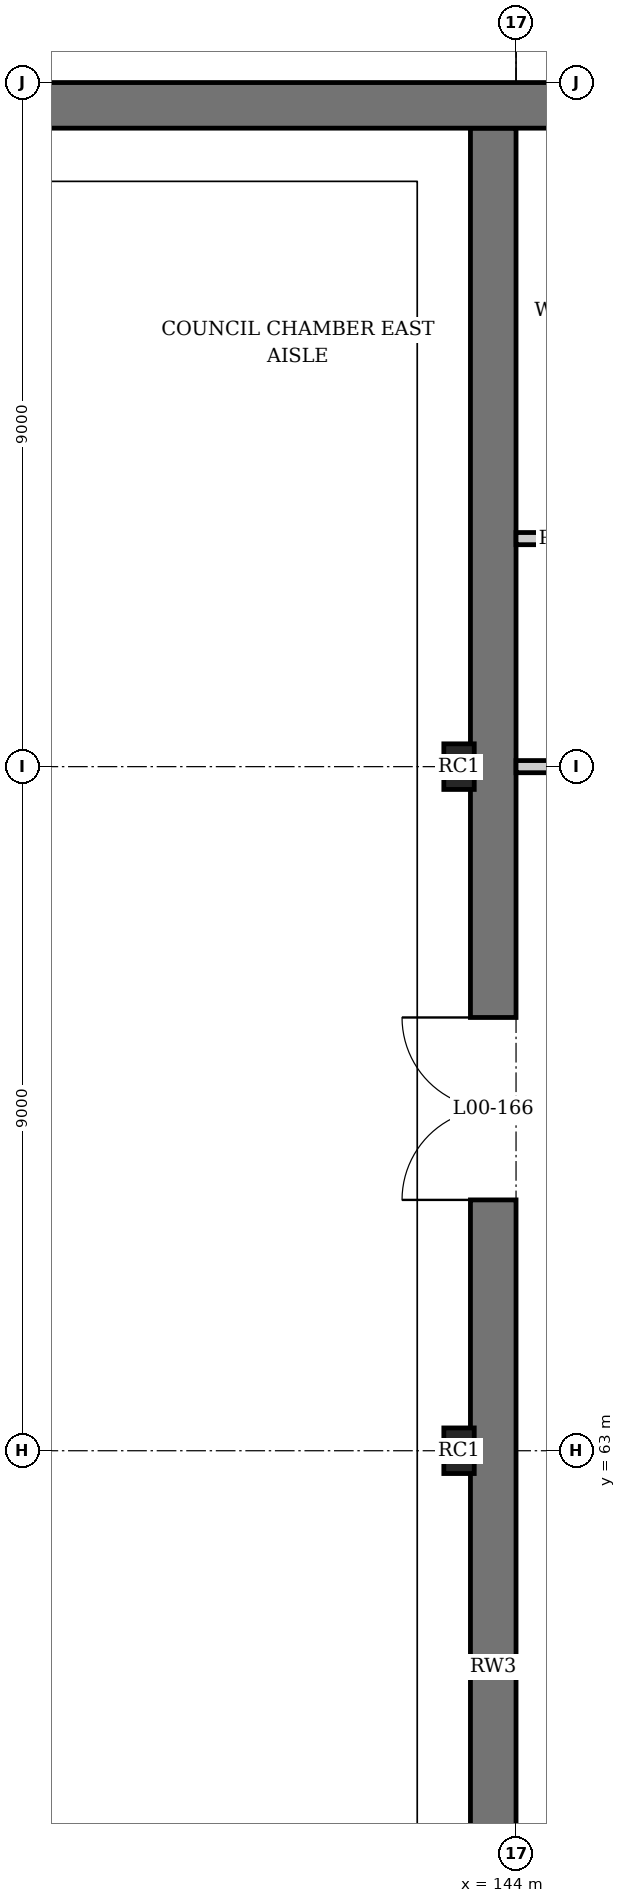
"""IFC4 building model, lengths in metres.
Left out: names, types, materials, properties, quantities, classifications, styles, units other than length and angle.
Written with IfcOpenShell. Run it as: python <this file> out.ifc"""

import sys

from ifc_helpers import new_model, si_unit, direction, frame, frame_2d, origin, origin_2d, place, context, subcontext, project, spatial, rectangle, extrude, element, fill, save


model = new_model("IFC4")
c1 = context("Model", 3, precision=1e-05, world=origin(), true_north=direction((0.0, 1.0)))
c2 = subcontext(c1, "Body", "Model", "MODEL_VIEW")
j1 = project(units=[si_unit("LENGTHUNIT", "METRE"), si_unit("PLANEANGLEUNIT", "RADIAN")], contexts=[c1])
p1 = place(None, origin())
s1 = spatial("IfcSite", under=j1, at=p1, CompositionType="ELEMENT")
p2 = place(p1, origin())
s2 = spatial("IfcBuilding", under=s1, at=p2, CompositionType="ELEMENT")
p3 = place(p2, origin())
s3 = spatial("IfcBuildingStorey", under=s2, at=p3, CompositionType="ELEMENT", Elevation=0.0)
p4 = place(p3, frame((143.7, 54.0, 0.0), z_axis=(0.0, 0.0, 1.0), x_axis=(0.0, 1.0, 0.0)))
e1 = element("IfcWall", 1, at=p4, inside=s3, PredefinedType="SHEAR", context=c2, shape_type="SweptSolid", body=[
    extrude(rectangle(XDim=26.4, YDim=0.6, at=frame_2d((13.2, 0.0))), origin(), (0.0, 0.0, 1.0), 6.0),
])
p5 = place(p4, frame((12.3, 0.0, 0.0)))
e2 = element("IfcOpeningElement", 2, at=p5, cuts=e1, PredefinedType="OPENING", context=c2, shape_type="SweptSolid", body=[
    extrude(rectangle(XDim=2.4, YDim=2.4, at=frame_2d((1.2, 1.2))), frame((0.0, 0.31, 0.0), z_axis=(0.0, -1.0, 0.0), x_axis=(1.0, 0.0, 0.0)), (0.0, 0.0, 1.0), 0.62),
])
for number, where, z_axis, x_axis in (
    (3, (143.25, 63.0, 0.0), (0.0, 0.0, 1.0), (0.0, 1.0, 0.0)),
    (4, (143.25, 72.0, 0.0), (0.0, 0.0, 1.0), (0.0, 1.0, 0.0)),
):
    element("IfcColumn", number, at=place(p3, frame(where, z_axis=z_axis, x_axis=x_axis)), inside=s3, PredefinedType="PILASTER", context=c2, shape_type="SweptSolid", body=[
        extrude(rectangle(XDim=0.6, YDim=0.4, at=origin_2d()), origin(), (0.0, 0.0, 1.0), 6.0),
    ])
p6 = place(p3, frame((0.0, 80.7, 0.0), z_axis=(0.0, 0.0, 1.0), x_axis=(1.0, 0.0, 0.0)))
e5 = element("IfcWall", 5, at=p6, inside=s3, PredefinedType="SHEAR", context=c2, shape_type="SweptSolid", body=[
    extrude(rectangle(XDim=180.0, YDim=0.6, at=frame_2d((90.0, 0.0))), origin(), (0.0, 0.0, 1.0), 6.0),
])
p7 = place(p6, frame((28.25, 0.0, 0.0)))
e6 = element("IfcOpeningElement", 6, at=p7, cuts=e5, PredefinedType="OPENING", context=c2, shape_type="SweptSolid", body=[
    extrude(rectangle(XDim=1.8, YDim=2.4, at=frame_2d((0.9, 1.2))), frame((0.0, 0.31, 0.0), z_axis=(0.0, -1.0, 0.0), x_axis=(1.0, 0.0, 0.0)), (0.0, 0.0, 1.0), 0.62),
])
p8 = place(p6, frame((82.25, 0.0, 0.0)))
e7 = element("IfcOpeningElement", 7, at=p8, cuts=e5, PredefinedType="OPENING", context=c2, shape_type="SweptSolid", body=[
    extrude(rectangle(XDim=1.8, YDim=2.4, at=frame_2d((0.9, 1.2))), frame((0.0, 0.31, 0.0), z_axis=(0.0, -1.0, 0.0), x_axis=(1.0, 0.0, 0.0)), (0.0, 0.0, 1.0), 0.62),
])
p9 = place(p6, frame((90.75, 0.0, 0.0)))
e8 = element("IfcOpeningElement", 8, at=p9, cuts=e5, PredefinedType="OPENING", context=c2, shape_type="SweptSolid", body=[
    extrude(rectangle(XDim=3.0, YDim=3.0, at=frame_2d((1.5, 1.5))), frame((0.0, 0.31, 0.0), z_axis=(0.0, -1.0, 0.0), x_axis=(1.0, 0.0, 0.0)), (0.0, 0.0, 1.0), 0.62),
])
p10 = place(p6, frame((95.25, 0.0, 0.0)))
e9 = element("IfcOpeningElement", 9, at=p10, cuts=e5, PredefinedType="OPENING", context=c2, shape_type="SweptSolid", body=[
    extrude(rectangle(XDim=3.0, YDim=3.0, at=frame_2d((1.5, 1.5))), frame((0.0, 0.31, 0.0), z_axis=(0.0, -1.0, 0.0), x_axis=(1.0, 0.0, 0.0)), (0.0, 0.0, 1.0), 0.62),
])
p11 = place(p6, frame((1.35, 0.0, 0.9)))
e10 = element("IfcOpeningElement", 10, at=p11, cuts=e5, PredefinedType="OPENING", context=c2, shape_type="SweptSolid", body=[
    extrude(rectangle(XDim=1.8, YDim=1.5, at=frame_2d((0.9, 0.75))), frame((0.0, 0.31, 0.0), z_axis=(0.0, -1.0, 0.0), x_axis=(1.0, 0.0, 0.0)), (0.0, 0.0, 1.0), 0.62),
])
p12 = place(p6, frame((5.85, 0.0, 0.9)))
e11 = element("IfcOpeningElement", 11, at=p12, cuts=e5, PredefinedType="OPENING", context=c2, shape_type="SweptSolid", body=[
    extrude(rectangle(XDim=1.8, YDim=1.5, at=frame_2d((0.9, 0.75))), frame((0.0, 0.31, 0.0), z_axis=(0.0, -1.0, 0.0), x_axis=(1.0, 0.0, 0.0)), (0.0, 0.0, 1.0), 0.62),
])
p13 = place(p6, frame((10.35, 0.0, 0.9)))
e12 = element("IfcOpeningElement", 12, at=p13, cuts=e5, PredefinedType="OPENING", context=c2, shape_type="SweptSolid", body=[
    extrude(rectangle(XDim=1.8, YDim=1.5, at=frame_2d((0.9, 0.75))), frame((0.0, 0.31, 0.0), z_axis=(0.0, -1.0, 0.0), x_axis=(1.0, 0.0, 0.0)), (0.0, 0.0, 1.0), 0.62),
])
p14 = place(p6, frame((14.85, 0.0, 0.9)))
e13 = element("IfcOpeningElement", 13, at=p14, cuts=e5, PredefinedType="OPENING", context=c2, shape_type="SweptSolid", body=[
    extrude(rectangle(XDim=1.8, YDim=1.5, at=frame_2d((0.9, 0.75))), frame((0.0, 0.31, 0.0), z_axis=(0.0, -1.0, 0.0), x_axis=(1.0, 0.0, 0.0)), (0.0, 0.0, 1.0), 0.62),
])
p15 = place(p6, frame((19.65, 0.0, 1.2)))
e14 = element("IfcOpeningElement", 14, at=p15, cuts=e5, PredefinedType="OPENING", context=c2, shape_type="SweptSolid", body=[
    extrude(rectangle(XDim=1.2, YDim=1.2, at=frame_2d((0.6, 0.6))), frame((0.0, 0.31, 0.0), z_axis=(0.0, -1.0, 0.0), x_axis=(1.0, 0.0, 0.0)), (0.0, 0.0, 1.0), 0.62),
])
p16 = place(p6, frame((24.15, 0.0, 1.2)))
e15 = element("IfcOpeningElement", 15, at=p16, cuts=e5, PredefinedType="OPENING", context=c2, shape_type="SweptSolid", body=[
    extrude(rectangle(XDim=1.2, YDim=1.2, at=frame_2d((0.6, 0.6))), frame((0.0, 0.31, 0.0), z_axis=(0.0, -1.0, 0.0), x_axis=(1.0, 0.0, 0.0)), (0.0, 0.0, 1.0), 0.62),
])
p17 = place(p6, frame((37.35, 0.0, 0.9)))
e16 = element("IfcOpeningElement", 16, at=p17, cuts=e5, PredefinedType="OPENING", context=c2, shape_type="SweptSolid", body=[
    extrude(rectangle(XDim=1.8, YDim=1.5, at=frame_2d((0.9, 0.75))), frame((0.0, 0.31, 0.0), z_axis=(0.0, -1.0, 0.0), x_axis=(1.0, 0.0, 0.0)), (0.0, 0.0, 1.0), 0.62),
])
p18 = place(p6, frame((41.85, 0.0, 0.9)))
e17 = element("IfcOpeningElement", 17, at=p18, cuts=e5, PredefinedType="OPENING", context=c2, shape_type="SweptSolid", body=[
    extrude(rectangle(XDim=1.8, YDim=1.5, at=frame_2d((0.9, 0.75))), frame((0.0, 0.31, 0.0), z_axis=(0.0, -1.0, 0.0), x_axis=(1.0, 0.0, 0.0)), (0.0, 0.0, 1.0), 0.62),
])
p19 = place(p6, frame((46.35, 0.0, 0.9)))
e18 = element("IfcOpeningElement", 18, at=p19, cuts=e5, PredefinedType="OPENING", context=c2, shape_type="SweptSolid", body=[
    extrude(rectangle(XDim=1.8, YDim=1.5, at=frame_2d((0.9, 0.75))), frame((0.0, 0.31, 0.0), z_axis=(0.0, -1.0, 0.0), x_axis=(1.0, 0.0, 0.0)), (0.0, 0.0, 1.0), 0.62),
])
p20 = place(p6, frame((50.85, 0.0, 0.9)))
e19 = element("IfcOpeningElement", 19, at=p20, cuts=e5, PredefinedType="OPENING", context=c2, shape_type="SweptSolid", body=[
    extrude(rectangle(XDim=1.8, YDim=1.5, at=frame_2d((0.9, 0.75))), frame((0.0, 0.31, 0.0), z_axis=(0.0, -1.0, 0.0), x_axis=(1.0, 0.0, 0.0)), (0.0, 0.0, 1.0), 0.62),
])
p21 = place(p6, frame((55.35, 0.0, 0.9)))
e20 = element("IfcOpeningElement", 20, at=p21, cuts=e5, PredefinedType="OPENING", context=c2, shape_type="SweptSolid", body=[
    extrude(rectangle(XDim=1.8, YDim=1.5, at=frame_2d((0.9, 0.75))), frame((0.0, 0.31, 0.0), z_axis=(0.0, -1.0, 0.0), x_axis=(1.0, 0.0, 0.0)), (0.0, 0.0, 1.0), 0.62),
])
p22 = place(p6, frame((59.85, 0.0, 0.9)))
e21 = element("IfcOpeningElement", 21, at=p22, cuts=e5, PredefinedType="OPENING", context=c2, shape_type="SweptSolid", body=[
    extrude(rectangle(XDim=1.8, YDim=1.5, at=frame_2d((0.9, 0.75))), frame((0.0, 0.31, 0.0), z_axis=(0.0, -1.0, 0.0), x_axis=(1.0, 0.0, 0.0)), (0.0, 0.0, 1.0), 0.62),
])
p23 = place(p6, frame((64.35, 0.0, 0.9)))
e22 = element("IfcOpeningElement", 22, at=p23, cuts=e5, PredefinedType="OPENING", context=c2, shape_type="SweptSolid", body=[
    extrude(rectangle(XDim=1.8, YDim=1.5, at=frame_2d((0.9, 0.75))), frame((0.0, 0.31, 0.0), z_axis=(0.0, -1.0, 0.0), x_axis=(1.0, 0.0, 0.0)), (0.0, 0.0, 1.0), 0.62),
])
p24 = place(p6, frame((68.85, 0.0, 0.9)))
e23 = element("IfcOpeningElement", 23, at=p24, cuts=e5, PredefinedType="OPENING", context=c2, shape_type="SweptSolid", body=[
    extrude(rectangle(XDim=1.8, YDim=1.5, at=frame_2d((0.9, 0.75))), frame((0.0, 0.31, 0.0), z_axis=(0.0, -1.0, 0.0), x_axis=(1.0, 0.0, 0.0)), (0.0, 0.0, 1.0), 0.62),
])
p25 = place(p6, frame((73.35, 0.0, 0.9)))
e24 = element("IfcOpeningElement", 24, at=p25, cuts=e5, PredefinedType="OPENING", context=c2, shape_type="SweptSolid", body=[
    extrude(rectangle(XDim=1.8, YDim=1.5, at=frame_2d((0.9, 0.75))), frame((0.0, 0.31, 0.0), z_axis=(0.0, -1.0, 0.0), x_axis=(1.0, 0.0, 0.0)), (0.0, 0.0, 1.0), 0.62),
])
p26 = place(p6, frame((77.85, 0.0, 0.9)))
e25 = element("IfcOpeningElement", 25, at=p26, cuts=e5, PredefinedType="OPENING", context=c2, shape_type="SweptSolid", body=[
    extrude(rectangle(XDim=1.8, YDim=1.5, at=frame_2d((0.9, 0.75))), frame((0.0, 0.31, 0.0), z_axis=(0.0, -1.0, 0.0), x_axis=(1.0, 0.0, 0.0)), (0.0, 0.0, 1.0), 0.62),
])
p27 = place(p6, frame((100.8, 0.0, 1.7)))
e26 = element("IfcOpeningElement", 26, at=p27, cuts=e5, PredefinedType="OPENING", context=c2, shape_type="SweptSolid", body=[
    extrude(rectangle(XDim=0.9, YDim=0.6, at=frame_2d((0.45, 0.3))), frame((0.0, 0.31, 0.0), z_axis=(0.0, -1.0, 0.0), x_axis=(1.0, 0.0, 0.0)), (0.0, 0.0, 1.0), 0.62),
])
p28 = place(p6, frame((105.3, 0.0, 1.7)))
e27 = element("IfcOpeningElement", 27, at=p28, cuts=e5, PredefinedType="OPENING", context=c2, shape_type="SweptSolid", body=[
    extrude(rectangle(XDim=0.9, YDim=0.6, at=frame_2d((0.45, 0.3))), frame((0.0, 0.31, 0.0), z_axis=(0.0, -1.0, 0.0), x_axis=(1.0, 0.0, 0.0)), (0.0, 0.0, 1.0), 0.62),
])
p29 = place(p6, frame((109.8, 0.0, 1.7)))
e28 = element("IfcOpeningElement", 28, at=p29, cuts=e5, PredefinedType="OPENING", context=c2, shape_type="SweptSolid", body=[
    extrude(rectangle(XDim=0.9, YDim=0.6, at=frame_2d((0.45, 0.3))), frame((0.0, 0.31, 0.0), z_axis=(0.0, -1.0, 0.0), x_axis=(1.0, 0.0, 0.0)), (0.0, 0.0, 1.0), 0.62),
])
p30 = place(p6, frame((154.65, 0.0, 1.2)))
e29 = element("IfcOpeningElement", 29, at=p30, cuts=e5, PredefinedType="OPENING", context=c2, shape_type="SweptSolid", body=[
    extrude(rectangle(XDim=1.2, YDim=1.2, at=frame_2d((0.6, 0.6))), frame((0.0, 0.31, 0.0), z_axis=(0.0, -1.0, 0.0), x_axis=(1.0, 0.0, 0.0)), (0.0, 0.0, 1.0), 0.62),
])
p31 = place(p6, frame((159.15, 0.0, 1.2)))
e30 = element("IfcOpeningElement", 30, at=p31, cuts=e5, PredefinedType="OPENING", context=c2, shape_type="SweptSolid", body=[
    extrude(rectangle(XDim=1.2, YDim=1.2, at=frame_2d((0.6, 0.6))), frame((0.0, 0.31, 0.0), z_axis=(0.0, -1.0, 0.0), x_axis=(1.0, 0.0, 0.0)), (0.0, 0.0, 1.0), 0.62),
])
p32 = place(p6, frame((163.8, 0.0, 1.7)))
e31 = element("IfcOpeningElement", 31, at=p32, cuts=e5, PredefinedType="OPENING", context=c2, shape_type="SweptSolid", body=[
    extrude(rectangle(XDim=0.9, YDim=0.6, at=frame_2d((0.45, 0.3))), frame((0.0, 0.31, 0.0), z_axis=(0.0, -1.0, 0.0), x_axis=(1.0, 0.0, 0.0)), (0.0, 0.0, 1.0), 0.62),
])
p33 = place(p6, frame((168.3, 0.0, 1.7)))
e32 = element("IfcOpeningElement", 32, at=p33, cuts=e5, PredefinedType="OPENING", context=c2, shape_type="SweptSolid", body=[
    extrude(rectangle(XDim=0.9, YDim=0.6, at=frame_2d((0.45, 0.3))), frame((0.0, 0.31, 0.0), z_axis=(0.0, -1.0, 0.0), x_axis=(1.0, 0.0, 0.0)), (0.0, 0.0, 1.0), 0.62),
])
p34 = place(p6, frame((107.55, 0.0, 1.7)))
e33 = element("IfcOpeningElement", 33, at=p34, cuts=e5, PredefinedType="OPENING", context=c2, shape_type="SweptSolid", body=[
    extrude(rectangle(XDim=0.9, YDim=0.6, at=frame_2d((0.45, 0.3))), frame((0.0, 0.31, 0.0), z_axis=(0.0, -1.0, 0.0), x_axis=(1.0, 0.0, 0.0)), (0.0, 0.0, 1.0), 0.62),
])
p35 = place(p6, frame((112.3, 0.0, 1.7)))
e34 = element("IfcOpeningElement", 34, at=p35, cuts=e5, PredefinedType="OPENING", context=c2, shape_type="SweptSolid", body=[
    extrude(rectangle(XDim=0.9, YDim=0.6, at=frame_2d((0.45, 0.3))), frame((0.0, 0.31, 0.0), z_axis=(0.0, -1.0, 0.0), x_axis=(1.0, 0.0, 0.0)), (0.0, 0.0, 1.0), 0.62),
])
p36 = place(p6, frame((166.05, 0.0, 1.7)))
e35 = element("IfcOpeningElement", 35, at=p36, cuts=e5, PredefinedType="OPENING", context=c2, shape_type="SweptSolid", body=[
    extrude(rectangle(XDim=0.9, YDim=0.6, at=frame_2d((0.45, 0.3))), frame((0.0, 0.31, 0.0), z_axis=(0.0, -1.0, 0.0), x_axis=(1.0, 0.0, 0.0)), (0.0, 0.0, 1.0), 0.62),
])
p37 = place(p3, frame((144.0, 72.0, 0.0), z_axis=(0.0, 0.0, 1.0), x_axis=(1.0, 0.0, 0.0)))
e36 = element("IfcWall", 36, at=p37, inside=s3, PredefinedType="PARTITIONING", context=c2, shape_type="SweptSolid", body=[
    extrude(rectangle(XDim=8.836, YDim=0.16, at=frame_2d((4.418, 0.0))), origin(), (0.0, 0.0, 1.0), 4.85),
])
p38 = place(p37, frame((4.1, 0.0, 0.0)))
e37 = element("IfcOpeningElement", 37, at=p38, cuts=e36, PredefinedType="OPENING", context=c2, shape_type="SweptSolid", body=[
    extrude(rectangle(XDim=1.0, YDim=2.1, at=frame_2d((0.5, 1.05))), frame((0.0, 0.09, 0.0), z_axis=(0.0, -1.0, 0.0), x_axis=(1.0, 0.0, 0.0)), (0.0, 0.0, 1.0), 0.18),
])
p39 = place(p3, frame((144.0, 75.0, 0.0), z_axis=(0.0, 0.0, 1.0), x_axis=(1.0, 0.0, 0.0)))
e38 = element("IfcWall", 38, at=p39, inside=s3, PredefinedType="PARTITIONING", context=c2, shape_type="SweptSolid", body=[
    extrude(rectangle(XDim=2.89, YDim=0.16, at=frame_2d((1.445, 0.0))), origin(), (0.0, 0.0, 1.0), 5.85),
])
p40 = place(p39, frame((1.1, 0.0, 0.0)))
e39 = element("IfcOpeningElement", 39, at=p40, cuts=e38, PredefinedType="OPENING", context=c2, shape_type="SweptSolid", body=[
    extrude(rectangle(XDim=1.0, YDim=2.1, at=frame_2d((0.5, 1.05))), frame((0.0, 0.09, 0.0), z_axis=(0.0, -1.0, 0.0), x_axis=(1.0, 0.0, 0.0)), (0.0, 0.0, 1.0), 0.18),
])
p41 = place(p5, origin())
e40 = element("IfcDoor", 40, at=p41, inside=s3, OperationType="DOUBLE_DOOR_SINGLE_SWING", PredefinedType="DOOR", context=c2, shape_type="SweptSolid", body=[
    extrude(rectangle(XDim=2.4, YDim=2.4, at=frame_2d((1.2, 1.2))), frame((0.0, 0.025, 0.0), z_axis=(0.0, -1.0, 0.0), x_axis=(1.0, 0.0, 0.0)), (0.0, 0.0, 1.0), 0.05),
])
fill(e2, e40)
save(model, sys.argv[1])
